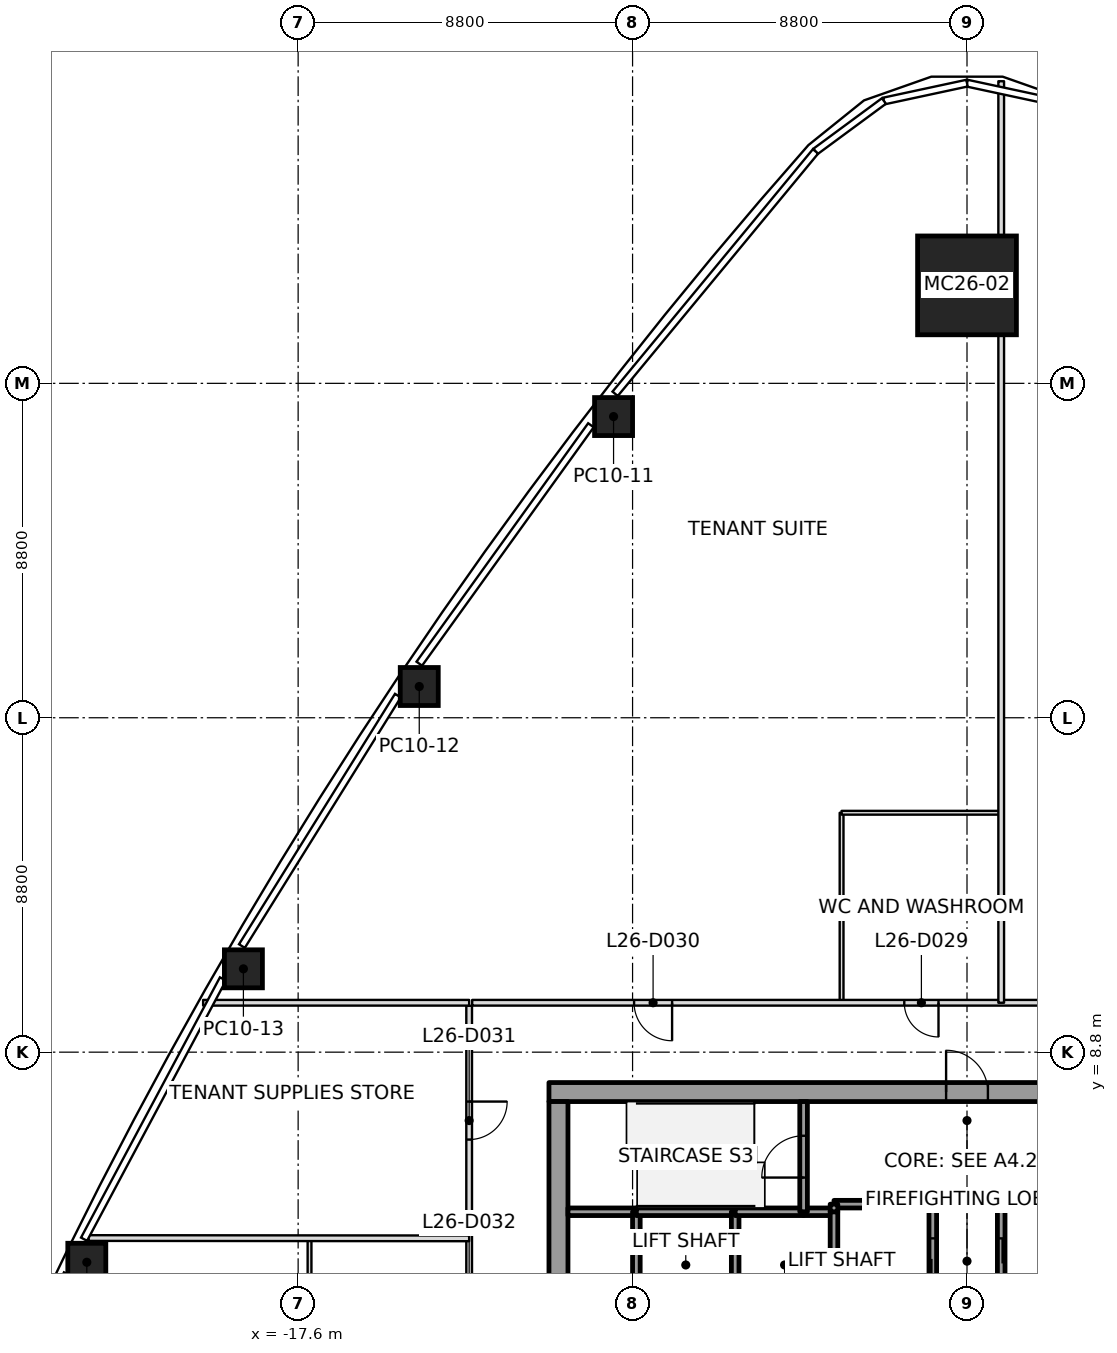
"""IFC4 building model, lengths in metres.
Left out: names, types, materials, properties, quantities, classifications, styles, units other than length and angle.
Written with IfcOpenShell. Run it as: python <this file> out.ifc"""

import sys

from ifc_helpers import new_model, si_unit, direction, frame, frame_2d, origin, origin_2d, place, context, subcontext, project, spatial, rectangle, extrude, clip, halfspace, element, fill, save


model = new_model("IFC4")
c1 = context("Model", 3, precision=1e-05, world=origin(), true_north=direction((0.0, 1.0)))
c2 = subcontext(c1, "Body", "Model", "MODEL_VIEW")
j1 = project(units=[si_unit("LENGTHUNIT", "METRE"), si_unit("PLANEANGLEUNIT", "RADIAN")], contexts=[c1])
p1 = place(None, origin())
s1 = spatial("IfcSite", under=j1, at=p1, CompositionType="ELEMENT")
p2 = place(p1, origin())
s2 = spatial("IfcBuilding", under=s1, at=p2, CompositionType="ELEMENT")
p3 = place(p2, frame((0.0, 0.0, 125.8)))
s3 = spatial("IfcBuildingStorey", under=s2, at=p3, CompositionType="ELEMENT", Elevation=125.8)
p4 = place(p3, frame((0.0, 28.978, 0.0), z_axis=(0.0, -0.032453598962, 0.999473243221), x_axis=(1.0, 0.0, 0.0)))
e1 = element("IfcColumn", 1, at=p4, inside=s3, PredefinedType="COLUMN", context=c2, shape_type="SweptSolid", body=[
    clip(extrude(rectangle(XDim=2.6, YDim=2.6, at=origin_2d()), origin(), (0.0, 0.0, 1.0), 4.002), halfspace(frame((0.0, 0.0, 0.01)), True)),
])
p5 = place(p3, frame((-9.3, 25.526, 0.0), z_axis=(0.000183066744, -0.020564497584, 0.999788511599), x_axis=(0.610992464554, 0.791471295287, 0.016167776435)))
e2 = element("IfcColumn", 2, at=p5, inside=s3, PredefinedType="COLUMN", context=c2, shape_type="SweptSolid", body=[
    clip(extrude(rectangle(XDim=1.0, YDim=1.0, at=origin_2d()), origin(), (0.0, 0.0, 1.0), 4.001), halfspace(frame((0.0, 0.0, 0.003)), True)),
])
p6 = place(p3, frame((-14.413, 18.422, 0.0), z_axis=(0.005248486563, -0.013304303149, 0.999897719223), x_axis=(0.556731672448, 0.830652602825, 0.008130086889)))
e3 = element("IfcColumn", 3, at=p6, inside=s3, PredefinedType="COLUMN", context=c2, shape_type="SweptSolid", body=[
    clip(extrude(rectangle(XDim=1.0, YDim=1.0, at=origin_2d()), origin(), (0.0, 0.0, 1.0), 4.0), halfspace(frame((0.0, 0.0, 0.002)), True)),
])
p7 = place(p3, frame((-19.04, 10.993, 0.0), z_axis=(0.009948074445, -0.005736926367, 0.999934059571), x_axis=(0.499975258342, 0.8660396879, -5.385525e-06)))
e4 = element("IfcColumn", 4, at=p7, inside=s3, PredefinedType="COLUMN", context=c2, shape_type="SweptSolid", body=[
    clip(extrude(rectangle(XDim=1.0, YDim=1.0, at=origin_2d()), origin(), (0.0, 0.0, 1.0), 4.0), halfspace(frame((0.0, 0.0, 0.002)), True)),
])
p8 = place(p3, frame((-23.161, 3.271, 0.0), z_axis=(0.014158706356, 0.002074982828, 0.999897607498), x_axis=(0.440982382109, 0.897479146317, -0.008106823952)))
e5 = element("IfcColumn", 5, at=p8, inside=s3, PredefinedType="COLUMN", context=c2, shape_type="SweptSolid", body=[
    clip(extrude(rectangle(XDim=1.0, YDim=1.0, at=origin_2d()), origin(), (0.0, 0.0, 1.0), 4.0), halfspace(frame((0.0, 0.0, 0.002)), True)),
])
p9 = place(p3, frame((-11.0, 7.75, 0.0), z_axis=(0.0, 0.0, 1.0), x_axis=(1.0, 0.0, 0.0)))
e6 = element("IfcWall", 6, at=p9, inside=s3, PredefinedType="SHEAR", context=c2, shape_type="SweptSolid", body=[
    extrude(rectangle(XDim=22.0, YDim=0.5, at=frame_2d((11.0, 0.0))), origin(), (0.0, 0.0, 1.0), 4.0),
])
p10 = place(p9, frame((10.45, 0.0, 0.0)))
e7 = element("IfcOpeningElement", 7, at=p10, cuts=e6, PredefinedType="OPENING", context=c2, shape_type="SweptSolid", body=[
    extrude(rectangle(XDim=1.1, YDim=2.1, at=frame_2d((0.55, 1.05))), frame((0.0, 0.25, 0.0), z_axis=(0.0, -1.0, 0.0), x_axis=(1.0, 0.0, 0.0)), (0.0, 0.0, 1.0), 0.5),
])
p11 = place(p3, frame((-10.75, -7.5, 0.0), z_axis=(0.0, 0.0, 1.0), x_axis=(0.0, 1.0, 0.0)))
e8 = element("IfcWall", 8, at=p11, inside=s3, PredefinedType="SHEAR", context=c2, shape_type="SweptSolid", body=[
    extrude(rectangle(XDim=15.0, YDim=0.5, at=frame_2d((7.5, 0.0))), origin(), (0.0, 0.0, 1.0), 4.0),
])
p12 = place(p11, frame((6.6, 0.0, 0.0)))
e9 = element("IfcOpeningElement", 9, at=p12, cuts=e8, PredefinedType="OPENING", context=c2, shape_type="SweptSolid", body=[
    extrude(rectangle(XDim=1.8, YDim=2.1, at=frame_2d((0.9, 1.05))), frame((0.0, 0.25, 0.0), z_axis=(0.0, -1.0, 0.0), x_axis=(1.0, 0.0, 0.0)), (0.0, 0.0, 1.0), 0.5),
])
p13 = place(p3, frame((-8.7, 4.6, 0.0), z_axis=(0.0, 0.0, 1.0), x_axis=(-1.0, 0.0, 0.0)))
e10 = element("IfcWall", 10, at=p13, inside=s3, PredefinedType="SOLIDWALL", context=c2, shape_type="SweptSolid", body=[
    extrude(rectangle(XDim=1.8, YDim=0.2, at=frame_2d((0.9, 0.0))), origin(), (0.0, 0.0, 1.0), 3.85),
])
p14 = place(p3, frame((-8.7, 1.8, 0.0), z_axis=(0.0, 0.0, 1.0), x_axis=(0.0, 1.0, 0.0)))
e11 = element("IfcWall", 11, at=p14, inside=s3, PredefinedType="SOLIDWALL", context=c2, shape_type="SweptSolid", body=[
    extrude(rectangle(XDim=2.8, YDim=0.2, at=frame_2d((1.4, 0.0))), origin(), (0.0, 0.0, 1.0), 3.85),
])
p15 = place(p3, frame((-6.1, 4.6, 0.0), z_axis=(0.0, 0.0, 1.0), x_axis=(-1.0, 0.0, 0.0)))
e12 = element("IfcWall", 12, at=p15, inside=s3, PredefinedType="SOLIDWALL", context=c2, shape_type="SweptSolid", body=[
    extrude(rectangle(XDim=2.6, YDim=0.2, at=frame_2d((1.3, 0.0))), origin(), (0.0, 0.0, 1.0), 3.85),
])
p16 = place(p3, frame((-6.1, 1.8, 0.0), z_axis=(0.0, 0.0, 1.0), x_axis=(0.0, 1.0, 0.0)))
e13 = element("IfcWall", 13, at=p16, inside=s3, PredefinedType="SOLIDWALL", context=c2, shape_type="SweptSolid", body=[
    extrude(rectangle(XDim=2.8, YDim=0.2, at=frame_2d((1.4, 0.0))), origin(), (0.0, 0.0, 1.0), 3.85),
])
p17 = place(p3, frame((-4.3, 4.6, 0.0), z_axis=(0.0, 0.0, 1.0), x_axis=(-1.0, 0.0, 0.0)))
e14 = element("IfcWall", 14, at=p17, inside=s3, PredefinedType="SOLIDWALL", context=c2, shape_type="SweptSolid", body=[
    extrude(rectangle(XDim=1.8, YDim=0.2, at=frame_2d((0.9, 0.0))), origin(), (0.0, 0.0, 1.0), 3.85),
])
p18 = place(p3, frame((-3.5, 4.6, 0.0), z_axis=(0.0, 0.0, 1.0), x_axis=(-1.0, 0.0, 0.0)))
e15 = element("IfcWall", 15, at=p18, inside=s3, PredefinedType="SOLIDWALL", context=c2, shape_type="SweptSolid", body=[
    extrude(rectangle(XDim=0.8, YDim=0.2, at=frame_2d((0.4, 0.0))), origin(), (0.0, 0.0, 1.0), 3.85),
])
p19 = place(p3, frame((-4.3, 4.6, 0.0), z_axis=(0.0, 0.0, 1.0), x_axis=(0.0, 1.0, 0.0)))
e16 = element("IfcWall", 16, at=p19, inside=s3, PredefinedType="SOLIDWALL", context=c2, shape_type="SweptSolid", body=[
    extrude(rectangle(XDim=2.9, YDim=0.2, at=frame_2d((1.45, 0.0))), origin(), (0.0, 0.0, 1.0), 3.85),
])
p20 = place(p19, frame((0.9, 0.0, 0.0)))
e17 = element("IfcOpeningElement", 17, at=p20, cuts=e16, PredefinedType="OPENING", context=c2, shape_type="SweptSolid", body=[
    extrude(rectangle(XDim=1.1, YDim=2.1, at=frame_2d((0.55, 1.05))), frame((0.0, 0.1, 0.0), z_axis=(0.0, -1.0, 0.0), x_axis=(1.0, 0.0, 0.0)), (0.0, 0.0, 1.0), 0.2),
])
p21 = place(p3, frame((-3.5, 4.6, 0.0), z_axis=(0.0, 0.0, 1.0), x_axis=(0.0, -1.0, 0.0)))
e18 = element("IfcWall", 18, at=p21, inside=s3, PredefinedType="SOLIDWALL", context=c2, shape_type="SweptSolid", body=[
    extrude(rectangle(XDim=2.8, YDim=0.2, at=frame_2d((1.4, 0.0))), origin(), (0.0, 0.0, 1.0), 3.85),
])
p22 = place(p3, frame((-0.9, 1.8, 0.0), z_axis=(0.0, 0.0, 1.0), x_axis=(0.0, 1.0, 0.0)))
e19 = element("IfcWall", 19, at=p22, inside=s3, PredefinedType="SOLIDWALL", context=c2, shape_type="SweptSolid", body=[
    extrude(rectangle(XDim=3.0, YDim=0.2, at=frame_2d((1.5, 0.0))), origin(), (0.0, 0.0, 1.0), 3.85),
])
p23 = place(p22, frame((0.9, 0.0, 0.0)))
e20 = element("IfcOpeningElement", 20, at=p23, cuts=e19, PredefinedType="OPENING", context=c2, shape_type="SweptSolid", body=[
    extrude(rectangle(XDim=1.2, YDim=2.1, at=frame_2d((0.6, 1.05))), frame((0.0, 0.1, 0.0), z_axis=(0.0, -1.0, 0.0), x_axis=(1.0, 0.0, 0.0)), (0.0, 0.0, 1.0), 0.2),
])
p24 = place(p3, frame((-0.9, 4.8, 0.0), z_axis=(0.0, 0.0, 1.0), x_axis=(-1.0, 0.0, 0.0)))
e21 = element("IfcWall", 21, at=p24, inside=s3, PredefinedType="SOLIDWALL", context=c2, shape_type="SweptSolid", body=[
    extrude(rectangle(XDim=2.6, YDim=0.2, at=frame_2d((1.3, 0.0))), origin(), (0.0, 0.0, 1.0), 3.85),
])
p25 = place(p3, frame((-3.5, 4.8, 0.0), z_axis=(0.0, 0.0, 1.0), x_axis=(0.0, -1.0, 0.0)))
e22 = element("IfcWall", 22, at=p25, inside=s3, PredefinedType="SOLIDWALL", context=c2, shape_type="SweptSolid", body=[
    extrude(rectangle(XDim=0.2, YDim=0.2, at=frame_2d((0.1, 0.0))), origin(), (0.0, 0.0, 1.0), 3.85),
])
p26 = place(p3, frame((3.5, 4.8, 0.0), z_axis=(0.0, 0.0, 1.0), x_axis=(-1.0, 0.0, 0.0)))
e23 = element("IfcWall", 23, at=p26, inside=s3, PredefinedType="SOLIDWALL", context=c2, shape_type="SweptSolid", body=[
    extrude(rectangle(XDim=2.6, YDim=0.2, at=frame_2d((1.3, 0.0))), origin(), (0.0, 0.0, 1.0), 3.85),
])
p27 = place(p3, frame((0.9, 4.8, 0.0), z_axis=(0.0, 0.0, 1.0), x_axis=(0.0, -1.0, 0.0)))
e24 = element("IfcWall", 24, at=p27, inside=s3, PredefinedType="SOLIDWALL", context=c2, shape_type="SweptSolid", body=[
    extrude(rectangle(XDim=3.0, YDim=0.2, at=frame_2d((1.5, 0.0))), origin(), (0.0, 0.0, 1.0), 3.85),
])
p28 = place(p27, frame((0.9, 0.0, 0.0)))
e25 = element("IfcOpeningElement", 25, at=p28, cuts=e24, PredefinedType="OPENING", context=c2, shape_type="SweptSolid", body=[
    extrude(rectangle(XDim=1.2, YDim=2.1, at=frame_2d((0.6, 1.05))), frame((0.0, 0.1, 0.0), z_axis=(0.0, -1.0, 0.0), x_axis=(1.0, 0.0, 0.0)), (0.0, 0.0, 1.0), 0.2),
])
p29 = place(p3, frame((-13.1, 3.9, 0.0), z_axis=(0.0, 0.0, 1.0), x_axis=(-0.99999961506, 0.000877427823, 0.0)))
e26 = element("IfcWall", 26, at=p29, inside=s3, PredefinedType="PARTITIONING", context=c2, shape_type="SweptSolid", body=[
    extrude(rectangle(XDim=10.017, YDim=0.15, at=frame_2d((5.008, 0.0))), origin(), (0.0, 0.0, 1.0), 3.234),
])
p30 = place(p3, frame((-13.1, 10.1, 0.0), z_axis=(0.0, 0.0, 1.0), x_axis=(-1.0, 0.0, 0.0)))
e27 = element("IfcWall", 27, at=p30, inside=s3, PredefinedType="PARTITIONING", context=c2, shape_type="SweptSolid", body=[
    extrude(rectangle(XDim=7.0, YDim=0.15, at=frame_2d((3.5, 0.0))), origin(), (0.0, 0.0, 1.0), 3.234),
])
p31 = place(p3, frame((0.9, 10.1, 0.0), z_axis=(0.0, 0.0, 1.0), x_axis=(0.0, 1.0, 0.0)))
e28 = element("IfcWall", 28, at=p31, inside=s3, PredefinedType="PARTITIONING", context=c2, shape_type="SweptSolid", body=[
    extrude(rectangle(XDim=24.25, YDim=0.15, at=frame_2d((12.125, 0.0))), origin(), (0.0, 0.0, 1.0), 3.234),
])
p32 = place(p3, frame((-13.1, 10.02, 0.0), z_axis=(0.0, 0.0, 1.0), x_axis=(0.0, -1.0, 0.0)))
e29 = element("IfcWall", 29, at=p32, inside=s3, PredefinedType="PARTITIONING", context=c2, shape_type="SweptSolid", body=[
    extrude(rectangle(XDim=20.04, YDim=0.15, at=frame_2d((10.02, 0.0))), origin(), (0.0, 0.0, 1.0), 3.166),
])
p33 = place(p32, frame((2.52, 0.0, 0.0)))
e30 = element("IfcOpeningElement", 30, at=p33, cuts=e29, PredefinedType="OPENING", context=c2, shape_type="SweptSolid", body=[
    extrude(rectangle(XDim=1.0, YDim=2.1, at=frame_2d((0.5, 1.05))), frame((0.0, 0.075, 0.0), z_axis=(0.0, -1.0, 0.0), x_axis=(1.0, 0.0, 0.0)), (0.0, 0.0, 1.0), 0.15),
])
p34 = place(p32, frame((7.47, 0.0, 0.0)))
e31 = element("IfcOpeningElement", 31, at=p34, cuts=e29, PredefinedType="OPENING", context=c2, shape_type="SweptSolid", body=[
    extrude(rectangle(XDim=0.9, YDim=2.1, at=frame_2d((0.45, 1.05))), frame((0.0, 0.075, 0.0), z_axis=(0.0, -1.0, 0.0), x_axis=(1.0, 0.0, 0.0)), (0.0, 0.0, 1.0), 0.15),
])
p35 = place(p32, frame((14.48, 0.0, 0.0)))
e32 = element("IfcOpeningElement", 32, at=p35, cuts=e29, PredefinedType="OPENING", context=c2, shape_type="SweptSolid", body=[
    extrude(rectangle(XDim=1.0, YDim=2.1, at=frame_2d((0.5, 1.05))), frame((0.0, 0.075, 0.0), z_axis=(0.0, -1.0, 0.0), x_axis=(1.0, 0.0, 0.0)), (0.0, 0.0, 1.0), 0.15),
])
p36 = place(p3, frame((13.005, 10.1, 0.0), z_axis=(0.0, 0.0, 1.0), x_axis=(-1.0, 0.0, 0.0)))
e33 = element("IfcWall", 33, at=p36, inside=s3, PredefinedType="PARTITIONING", context=c2, shape_type="SweptSolid", body=[
    extrude(rectangle(XDim=26.025, YDim=0.15, at=frame_2d((13.012, 0.0))), origin(), (0.0, 0.0, 1.0), 3.166),
])
p37 = place(p36, frame((5.552, 0.0, 0.0)))
e34 = element("IfcOpeningElement", 34, at=p37, cuts=e33, PredefinedType="OPENING", context=c2, shape_type="SweptSolid", body=[
    extrude(rectangle(XDim=1.0, YDim=2.1, at=frame_2d((0.5, 1.05))), frame((0.0, 0.075, 0.0), z_axis=(0.0, -1.0, 0.0), x_axis=(1.0, 0.0, 0.0)), (0.0, 0.0, 1.0), 0.15),
])
p38 = place(p36, frame((13.755, 0.0, 0.0)))
e35 = element("IfcOpeningElement", 35, at=p38, cuts=e33, PredefinedType="OPENING", context=c2, shape_type="SweptSolid", body=[
    extrude(rectangle(XDim=0.9, YDim=2.1, at=frame_2d((0.45, 1.05))), frame((0.0, 0.075, 0.0), z_axis=(0.0, -1.0, 0.0), x_axis=(1.0, 0.0, 0.0)), (0.0, 0.0, 1.0), 0.15),
])
p39 = place(p36, frame((20.765, 0.0, 0.0)))
e36 = element("IfcOpeningElement", 36, at=p39, cuts=e33, PredefinedType="OPENING", context=c2, shape_type="SweptSolid", body=[
    extrude(rectangle(XDim=1.0, YDim=2.1, at=frame_2d((0.5, 1.05))), frame((0.0, 0.075, 0.0), z_axis=(0.0, -1.0, 0.0), x_axis=(1.0, 0.0, 0.0)), (0.0, 0.0, 1.0), 0.15),
])
p40 = place(p3, frame((-17.3, 0.3, 0.0), z_axis=(0.0, 0.0, 1.0), x_axis=(0.0, 1.0, 0.0)))
e37 = element("IfcWall", 37, at=p40, inside=s3, PredefinedType="PARTITIONING", context=c2, shape_type="SweptSolid", body=[
    extrude(rectangle(XDim=3.57, YDim=0.1, at=frame_2d((1.785, 0.0))), origin(), (0.0, 0.0, 1.0), 3.45),
])
p41 = place(p3, frame((-3.3, 10.13, 0.0), z_axis=(0.0, 0.0, 1.0), x_axis=(0.0, 1.0, 0.0)))
e38 = element("IfcWall", 38, at=p41, inside=s3, PredefinedType="PARTITIONING", context=c2, shape_type="SweptSolid", body=[
    extrude(rectangle(XDim=4.97, YDim=0.1, at=frame_2d((2.485, 0.0))), origin(), (0.0, 0.0, 1.0), 3.247),
])
p42 = place(p3, frame((-3.3, 15.1, 0.0), z_axis=(0.0, 0.0, 1.0), x_axis=(1.0, 0.0, 0.0)))
e39 = element("IfcWall", 39, at=p42, inside=s3, PredefinedType="PARTITIONING", context=c2, shape_type="SweptSolid", body=[
    extrude(rectangle(XDim=4.17, YDim=0.1, at=frame_2d((2.085, 0.0))), origin(), (0.0, 0.0, 1.0), 3.166),
])
p43 = place(p38, origin())
e40 = element("IfcDoor", 40, at=p43, inside=s3, OperationType="SINGLE_SWING_LEFT", PredefinedType="DOOR", context=c2, shape_type="SweptSolid", body=[
    extrude(rectangle(XDim=0.9, YDim=2.1, at=frame_2d((0.45, 1.05))), frame((0.0, 0.025, 0.0), z_axis=(0.0, -1.0, 0.0), x_axis=(1.0, 0.0, 0.0)), (0.0, 0.0, 1.0), 0.05),
])
fill(e35, e40)
p44 = place(p39, origin())
e41 = element("IfcDoor", 41, at=p44, inside=s3, OperationType="SINGLE_SWING_LEFT", PredefinedType="DOOR", context=c2, shape_type="SweptSolid", body=[
    extrude(rectangle(XDim=1.0, YDim=2.1, at=frame_2d((0.5, 1.05))), frame((0.0, 0.025, 0.0), z_axis=(0.0, -1.0, 0.0), x_axis=(1.0, 0.0, 0.0)), (0.0, 0.0, 1.0), 0.05),
])
fill(e36, e41)
p45 = place(p33, origin())
e42 = element("IfcDoor", 42, at=p45, inside=s3, OperationType="SINGLE_SWING_LEFT", PredefinedType="DOOR", context=c2, shape_type="SweptSolid", body=[
    extrude(rectangle(XDim=1.0, YDim=2.1, at=frame_2d((0.5, 1.05))), frame((0.0, 0.025, 0.0), z_axis=(0.0, -1.0, 0.0), x_axis=(1.0, 0.0, 0.0)), (0.0, 0.0, 1.0), 0.05),
])
fill(e30, e42)
p46 = place(p23, origin())
e43 = element("IfcDoor", 43, at=p46, inside=s3, OperationType="SLIDING_TO_RIGHT", PredefinedType="DOOR", context=c2, shape_type="SweptSolid", body=[
    extrude(rectangle(XDim=1.2, YDim=2.1, at=frame_2d((0.6, 1.05))), frame((0.0, 0.025, 0.0), z_axis=(0.0, -1.0, 0.0), x_axis=(1.0, 0.0, 0.0)), (0.0, 0.0, 1.0), 0.05),
])
fill(e20, e43)
p47 = place(p28, origin())
e44 = element("IfcDoor", 44, at=p47, inside=s3, OperationType="SLIDING_TO_LEFT", PredefinedType="DOOR", context=c2, shape_type="SweptSolid", body=[
    extrude(rectangle(XDim=1.2, YDim=2.1, at=frame_2d((0.6, 1.05))), frame((0.0, 0.025, 0.0), z_axis=(0.0, -1.0, 0.0), x_axis=(1.0, 0.0, 0.0)), (0.0, 0.0, 1.0), 0.05),
])
fill(e25, e44)
p48 = place(p20, origin())
e45 = element("IfcDoor", 45, at=p48, inside=s3, OperationType="SINGLE_SWING_LEFT", PredefinedType="DOOR", context=c2, shape_type="SweptSolid", body=[
    extrude(rectangle(XDim=1.1, YDim=2.1, at=frame_2d((0.55, 1.05))), frame((0.0, 0.025, 0.0), z_axis=(0.0, -1.0, 0.0), x_axis=(1.0, 0.0, 0.0)), (0.0, 0.0, 1.0), 0.05),
])
fill(e17, e45)
p49 = place(p10, origin())
e46 = element("IfcDoor", 46, at=p49, inside=s3, OperationType="SINGLE_SWING_LEFT", PredefinedType="DOOR", context=c2, shape_type="SweptSolid", body=[
    extrude(rectangle(XDim=1.1, YDim=2.1, at=frame_2d((0.55, 1.05))), frame((0.0, 0.025, 0.0), z_axis=(0.0, -1.0, 0.0), x_axis=(1.0, 0.0, 0.0)), (0.0, 0.0, 1.0), 0.05),
])
fill(e7, e46)
save(model, sys.argv[1])
